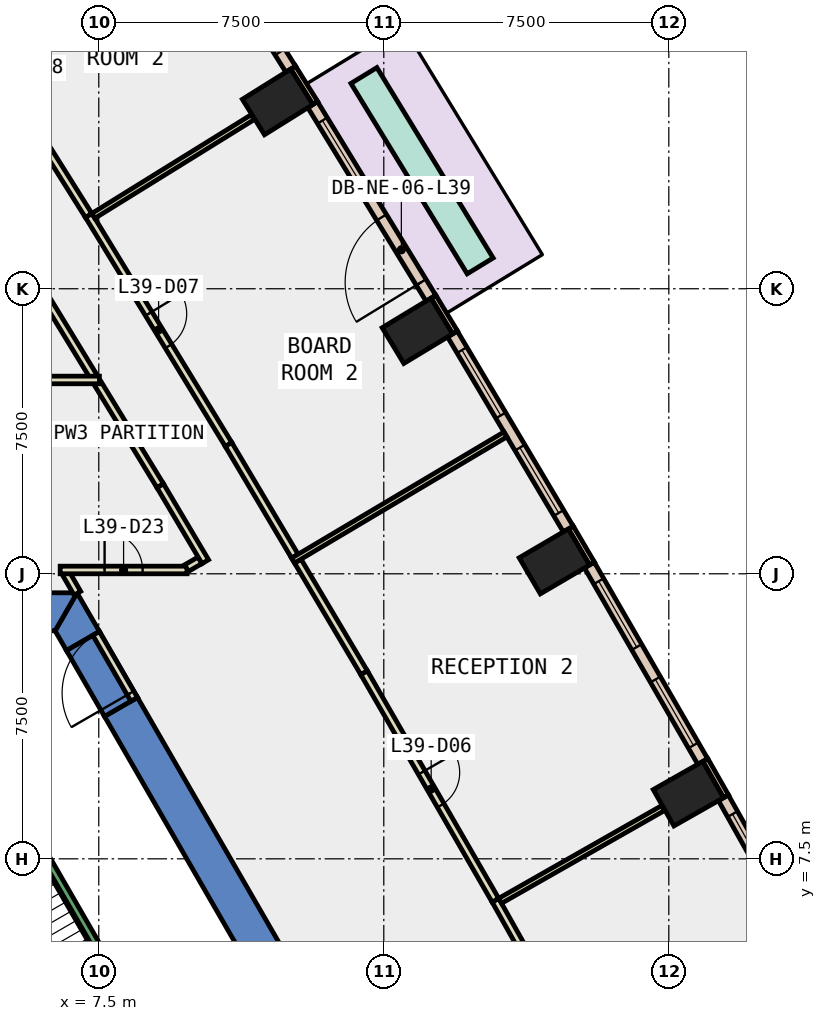
"""IFC4 building model, lengths in metres.
Left out: names, types, materials, properties, quantities, classifications, styles, units other than length and angle.
Written with IfcOpenShell. Run it as: python <this file> out.ifc"""

import sys

from ifc_helpers import new_model, si_unit, direction, frame, frame_2d, origin, origin_2d, place, context, subcontext, project, spatial, polyline, rectangle, outline, extrude, element, fill, save


model = new_model("IFC4")
c1 = context("Model", 3, precision=1e-05, world=origin(), true_north=direction((0.0, 1.0)))
c2 = subcontext(c1, "Body", "Model", "MODEL_VIEW")
j1 = project(units=[si_unit("LENGTHUNIT", "METRE"), si_unit("PLANEANGLEUNIT", "RADIAN")], contexts=[c1])
p1 = place(None, origin())
s1 = spatial("IfcSite", under=j1, at=p1, CompositionType="ELEMENT")
p2 = place(p1, origin())
s2 = spatial("IfcBuilding", under=s1, at=p2, CompositionType="ELEMENT")
p3 = place(p2, frame((0.0, 0.0, 176.0)))
s3 = spatial("IfcBuildingStorey", under=s2, at=p3, CompositionType="ELEMENT", Elevation=176.0)
for number, where, z_axis, x_axis in (
    (1, (23.015, 9.214, -0.4), (0.0, 0.0, 1.0), (-0.494, 0.869, 0.0)),
    (2, (19.488, 15.326, -0.4), (0.0, 0.0, 1.0), (-0.506, 0.863, 0.0)),
    (3, (15.884, 21.393, -0.4), (0.0, 0.0, 1.0), (-0.518, 0.855, 0.0)),
    (4, (12.206, 27.416, -0.4), (0.0, 0.0, 1.0), (-0.53, 0.848, 0.0)),
):
    element("IfcColumn", number, at=place(p3, frame(where, z_axis=z_axis, x_axis=x_axis)), inside=s3, PredefinedType="COLUMN", context=c2, shape_type="SweptSolid", body=[
        extrude(rectangle(XDim=1.1, YDim=1.5, at=origin_2d()), origin(), (0.0, 0.0, 1.0), 4.2),
    ])
p4 = place(p3, frame((0.0, 0.0, -0.4)))
e5 = element("IfcWall", 5, at=p4, inside=s3, PredefinedType="SHEAR", context=c2, shape_type="SweptSolid", body=[
    extrude(outline(polyline([(8.517, 11.748), (7.651, 11.248), (12.702, 2.5), (13.856, 2.5), (8.517, 11.748)])), origin(), (0.0, 0.0, 1.0), 4.2),
])
p5 = place(p3, frame((0.0, 0.0, -0.4)))
e6 = element("IfcWall", 6, at=p5, inside=s3, PredefinedType="SHEAR", context=c2, shape_type="SweptSolid", body=[
    extrude(outline(polyline([(6.651, 12.98), (7.517, 13.48), (6.928, 14.5), (6.351, 13.5), (6.651, 12.98)])), origin(), (0.0, 0.0, 1.0), 4.2),
])
p6 = place(p3, frame((0.0, 0.0, 3.6)))
e7 = element("IfcWall", 7, at=p6, inside=s3, PredefinedType="SHEAR", context=c2, shape_type="SweptSolid", body=[
    extrude(outline(polyline([(7.517, 13.48), (6.651, 12.98), (7.651, 11.248), (8.517, 11.748), (7.517, 13.48)])), origin(), (0.0, 0.0, 1.0), 0.2),
])
p7 = place(p3, frame((0.0, 0.0, -0.4)))
e8 = element("IfcWall", 8, at=p7, inside=s3, PredefinedType="SHEAR", context=c2, shape_type="SweptSolid", body=[
    extrude(outline(polyline([(6.928, 14.5), (-6.928, 14.5), (-6.351, 13.5), (6.351, 13.5), (6.928, 14.5)])), origin(), (0.0, 0.0, 1.0), 4.2),
])
p8 = place(p3, frame((24.005, 9.144, 0.0), z_axis=(0.0, 0.0, 1.0), x_axis=(-0.494512685492, 0.869170411305, 0.0)))
e9 = element("IfcWall", 9, at=p8, inside=s3, PredefinedType="STANDARD", context=c2, shape_type="SweptSolid", body=[
    extrude(rectangle(XDim=1.1, YDim=0.15, at=frame_2d((0.55, 0.0))), origin(), (0.0, 0.0, 1.0), 3.8),
])
p9 = place(p3, frame((20.478, 15.269, 0.0), z_axis=(0.0, 0.0, 1.0), x_axis=(-0.50667077411, 0.862139621327, 0.0)))
e10 = element("IfcWall", 10, at=p9, inside=s3, PredefinedType="STANDARD", context=c2, shape_type="SweptSolid", body=[
    extrude(rectangle(XDim=1.1, YDim=0.15, at=frame_2d((0.55, 0.0))), origin(), (0.0, 0.0, 1.0), 3.8),
])
p10 = place(p3, frame((16.875, 21.35, 0.0), z_axis=(0.0, 0.0, 1.0), x_axis=(-0.518178754102, 0.855272341888, 0.0)))
e11 = element("IfcWall", 11, at=p10, inside=s3, PredefinedType="STANDARD", context=c2, shape_type="SweptSolid", body=[
    extrude(rectangle(XDim=1.1, YDim=0.15, at=frame_2d((0.55, 0.0))), origin(), (0.0, 0.0, 1.0), 3.8),
])
p11 = place(p3, frame((13.197, 27.387, 0.0), z_axis=(0.0, 0.0, 1.0), x_axis=(-0.529879262372, 0.848073090782, 0.0)))
e12 = element("IfcWall", 12, at=p11, inside=s3, PredefinedType="STANDARD", context=c2, shape_type="SweptSolid", body=[
    extrude(rectangle(XDim=1.1, YDim=0.15, at=frame_2d((0.55, 0.0))), origin(), (0.0, 0.0, 1.0), 3.8),
])
p12 = place(p3, frame((26.857, 3.9, 0.0), z_axis=(0.0, 0.0, 1.0), x_axis=(-0.489305602904, 0.872112393541, 0.0)))
e13 = element("IfcWall", 13, at=p12, inside=s3, PredefinedType="STANDARD", context=c2, shape_type="SweptSolid", body=[
    extrude(rectangle(XDim=5.969, YDim=0.3, at=frame_2d((2.985, 0.0))), origin(), (0.0, 0.0, 1.0), 3.8),
])
p13 = place(p12, frame((0.492, 0.0, 0.9)))
e14 = element("IfcOpeningElement", 14, at=p13, cuts=e13, PredefinedType="OPENING", context=c2, shape_type="SweptSolid", body=[
    extrude(rectangle(XDim=2.0, YDim=2.6, at=frame_2d((1.0, 1.3))), frame((0.0, 0.16, 0.0), z_axis=(0.0, -1.0, 0.0), x_axis=(1.0, 0.0, 0.0)), (0.0, 0.0, 1.0), 0.32),
])
p14 = place(p12, frame((3.477, 0.0, 0.9)))
e15 = element("IfcOpeningElement", 15, at=p14, cuts=e13, PredefinedType="OPENING", context=c2, shape_type="SweptSolid", body=[
    extrude(rectangle(XDim=2.0, YDim=2.6, at=frame_2d((1.0, 1.3))), frame((0.0, 0.16, 0.0), z_axis=(0.0, -1.0, 0.0), x_axis=(1.0, 0.0, 0.0)), (0.0, 0.0, 1.0), 0.32),
])
p15 = place(p3, frame((23.393, 10.06, 0.0), z_axis=(0.0, 0.0, 1.0), x_axis=(-0.499908916093, 0.866077984716, 0.0)))
e16 = element("IfcWall", 16, at=p15, inside=s3, PredefinedType="STANDARD", context=c2, shape_type="SweptSolid", body=[
    extrude(rectangle(XDim=5.969, YDim=0.3, at=frame_2d((2.985, 0.0))), origin(), (0.0, 0.0, 1.0), 3.8),
])
p16 = place(p15, frame((0.492, 0.0, 0.9)))
e17 = element("IfcOpeningElement", 17, at=p16, cuts=e16, PredefinedType="OPENING", context=c2, shape_type="SweptSolid", body=[
    extrude(rectangle(XDim=2.0, YDim=2.6, at=frame_2d((1.0, 1.3))), frame((0.0, 0.16, 0.0), z_axis=(0.0, -1.0, 0.0), x_axis=(1.0, 0.0, 0.0)), (0.0, 0.0, 1.0), 0.32),
])
p17 = place(p15, frame((3.477, 0.0, 0.9)))
e18 = element("IfcOpeningElement", 18, at=p17, cuts=e16, PredefinedType="OPENING", context=c2, shape_type="SweptSolid", body=[
    extrude(rectangle(XDim=2.0, YDim=2.6, at=frame_2d((1.0, 1.3))), frame((0.0, 0.16, 0.0), z_axis=(0.0, -1.0, 0.0), x_axis=(1.0, 0.0, 0.0)), (0.0, 0.0, 1.0), 0.32),
])
p18 = place(p3, frame((19.854, 16.177, 0.0), z_axis=(0.0, 0.0, 1.0), x_axis=(-0.510653096173, 0.859786842984, 0.0)))
e19 = element("IfcWall", 19, at=p18, inside=s3, PredefinedType="STANDARD", context=c2, shape_type="SweptSolid", body=[
    extrude(rectangle(XDim=5.969, YDim=0.3, at=frame_2d((2.984, 0.0))), origin(), (0.0, 0.0, 1.0), 3.8),
])
p19 = place(p18, frame((0.492, 0.0, 0.9)))
e20 = element("IfcOpeningElement", 20, at=p19, cuts=e19, PredefinedType="OPENING", context=c2, shape_type="SweptSolid", body=[
    extrude(rectangle(XDim=2.0, YDim=2.6, at=frame_2d((1.0, 1.3))), frame((0.0, 0.16, 0.0), z_axis=(0.0, -1.0, 0.0), x_axis=(1.0, 0.0, 0.0)), (0.0, 0.0, 1.0), 0.32),
])
p20 = place(p18, frame((3.477, 0.0, 0.9)))
e21 = element("IfcOpeningElement", 21, at=p20, cuts=e19, PredefinedType="OPENING", context=c2, shape_type="SweptSolid", body=[
    extrude(rectangle(XDim=2.0, YDim=2.6, at=frame_2d((1.0, 1.3))), frame((0.0, 0.16, 0.0), z_axis=(0.0, -1.0, 0.0), x_axis=(1.0, 0.0, 0.0)), (0.0, 0.0, 1.0), 0.32),
])
p21 = place(p3, frame((16.24, 22.25, 0.0), z_axis=(0.0, 0.0, 1.0), x_axis=(-0.521263083766, 0.8533960379, 0.0)))
e22 = element("IfcWall", 22, at=p21, inside=s3, PredefinedType="STANDARD", context=c2, shape_type="SweptSolid", body=[
    extrude(rectangle(XDim=5.97, YDim=0.3, at=frame_2d((2.985, 0.0))), origin(), (0.0, 0.0, 1.0), 3.8),
])
p22 = place(p21, frame((0.493, 0.0, 0.0)))
e23 = element("IfcOpeningElement", 23, at=p22, cuts=e22, PredefinedType="OPENING", context=c2, shape_type="SweptSolid", body=[
    extrude(rectangle(XDim=2.0, YDim=2.4, at=frame_2d((1.0, 1.2))), frame((0.0, 0.16, 0.0), z_axis=(0.0, -1.0, 0.0), x_axis=(1.0, 0.0, 0.0)), (0.0, 0.0, 1.0), 0.32),
])
p23 = place(p21, frame((3.478, 0.0, 0.9)))
e24 = element("IfcOpeningElement", 24, at=p23, cuts=e22, PredefinedType="OPENING", context=c2, shape_type="SweptSolid", body=[
    extrude(rectangle(XDim=2.0, YDim=2.6, at=frame_2d((1.0, 1.3))), frame((0.0, 0.16, 0.0), z_axis=(0.0, -1.0, 0.0), x_axis=(1.0, 0.0, 0.0)), (0.0, 0.0, 1.0), 0.32),
])
p24 = place(p3, frame((12.55, 28.279, 0.0), z_axis=(0.0, 0.0, 1.0), x_axis=(-0.531816047834, 0.846859900613, 0.0)))
e25 = element("IfcWall", 25, at=p24, inside=s3, PredefinedType="STANDARD", context=c2, shape_type="SweptSolid", body=[
    extrude(rectangle(XDim=6.119, YDim=0.3, at=frame_2d((3.06, 0.0))), origin(), (0.0, 0.0, 1.0), 3.8),
])
p25 = place(p24, frame((0.53, 0.0, 0.9)))
e26 = element("IfcOpeningElement", 26, at=p25, cuts=e25, PredefinedType="OPENING", context=c2, shape_type="SweptSolid", body=[
    extrude(rectangle(XDim=2.0, YDim=2.6, at=frame_2d((1.0, 1.3))), frame((0.0, 0.16, 0.0), z_axis=(0.0, -1.0, 0.0), x_axis=(1.0, 0.0, 0.0)), (0.0, 0.0, 1.0), 0.32),
])
p26 = place(p24, frame((3.589, 0.0, 0.9)))
e27 = element("IfcOpeningElement", 27, at=p26, cuts=e25, PredefinedType="OPENING", context=c2, shape_type="SweptSolid", body=[
    extrude(rectangle(XDim=2.0, YDim=2.6, at=frame_2d((1.0, 1.3))), frame((0.0, 0.16, 0.0), z_axis=(0.0, -1.0, 0.0), x_axis=(1.0, 0.0, 0.0)), (0.0, 0.0, 1.0), 0.32),
])
p27 = place(p3, frame((17.536, 23.101, 0.0), z_axis=(0.0, 0.0, 1.0), x_axis=(-0.521098354491, 0.853496634409, 0.0)))
e28 = element("IfcWall", 28, at=p27, inside=s3, PredefinedType="STANDARD", context=c2, shape_type="SweptSolid", body=[
    extrude(rectangle(XDim=5.87, YDim=0.8, at=frame_2d((2.935, 0.0))), origin(), (0.0, 0.0, 1.0), 0.8),
])
p28 = place(p3, frame((6.937, 14.488, 0.0), z_axis=(0.0, 0.0, 1.0), x_axis=(-0.499908430952, 0.866078264744, 0.0)))
e29 = element("IfcWall", 29, at=p28, inside=s3, PredefinedType="PARTITIONING", context=c2, shape_type="SweptSolid", body=[
    extrude(rectangle(XDim=0.606, YDim=0.2, at=frame_2d((0.303, 0.0))), origin(), (0.0, 0.0, 1.0), 3.75),
])
p29 = place(p3, frame((6.484, 15.1, 0.0), z_axis=(0.0, 0.0, 1.0), x_axis=(1.0, 0.0, 0.0)))
e30 = element("IfcWall", 30, at=p29, inside=s3, PredefinedType="PARTITIONING", context=c2, shape_type="SweptSolid", body=[
    extrude(rectangle(XDim=3.339, YDim=0.2, at=frame_2d((1.669, 0.0))), origin(), (0.0, 0.0, 1.0), 3.75),
])
p30 = place(p29, frame((1.169, 0.0, 0.0)))
e31 = element("IfcOpeningElement", 31, at=p30, cuts=e30, PredefinedType="OPENING", context=c2, shape_type="SweptSolid", body=[
    extrude(rectangle(XDim=1.0, YDim=2.1, at=frame_2d((0.5, 1.05))), frame((0.0, 0.11, 0.0), z_axis=(0.0, -1.0, 0.0), x_axis=(1.0, 0.0, 0.0)), (0.0, 0.0, 1.0), 0.22),
])
p31 = place(p3, frame((9.81, 15.15, 0.0), z_axis=(0.0, 0.0, 1.0), x_axis=(0.865888002441, 0.500237910626, 0.0)))
e32 = element("IfcWall", 32, at=p31, inside=s3, PredefinedType="PARTITIONING", context=c2, shape_type="SweptSolid", body=[
    extrude(rectangle(XDim=0.41, YDim=0.2, at=frame_2d((0.205, 0.0))), origin(), (0.0, 0.0, 1.0), 3.75),
])
p32 = place(p3, frame((10.303, 15.319, 0.0), z_axis=(0.0, 0.0, 1.0), x_axis=(-0.510383520765, 0.859946894716, 0.0)))
e33 = element("IfcWall", 33, at=p32, inside=s3, PredefinedType="PARTITIONING", context=c2, shape_type="SweptSolid", body=[
    extrude(rectangle(XDim=2.326, YDim=0.2, at=frame_2d((1.163, 0.0))), origin(), (0.0, 0.0, 1.0), 3.75),
])
p33 = place(p3, frame((9.116, 17.319, 0.0), z_axis=(0.0, 0.0, 1.0), x_axis=(-0.521343721083, 0.853346778565, 0.0)))
e34 = element("IfcWall", 34, at=p33, inside=s3, PredefinedType="PARTITIONING", context=c2, shape_type="SweptSolid", body=[
    extrude(rectangle(XDim=3.159, YDim=0.2, at=frame_2d((1.58, 0.0))), origin(), (0.0, 0.0, 1.0), 3.75),
])
p34 = place(p3, frame((7.365, 20.185, 0.0), z_axis=(0.0, 0.0, 1.0), x_axis=(-0.521206053955, 0.853430869679, 0.0)))
e35 = element("IfcWall", 35, at=p34, inside=s3, PredefinedType="PARTITIONING", context=c2, shape_type="SweptSolid", body=[
    extrude(rectangle(XDim=3.603, YDim=0.2, at=frame_2d((1.802, 0.0))), origin(), (0.0, 0.0, 1.0), 3.75),
])
p35 = place(p3, frame((17.938, 6.411, 0.0), z_axis=(0.0, 0.0, 1.0), x_axis=(0.48930419744, -0.872113182086, 0.0)))
e36 = element("IfcWall", 36, at=p35, inside=s3, PredefinedType="PARTITIONING", context=c2, shape_type="SweptSolid", body=[
    extrude(rectangle(XDim=7.063, YDim=0.2, at=frame_2d((3.532, 0.0))), origin(), (0.0, 0.0, 1.0), 3.75),
])
p36 = place(p35, frame((3.032, 0.0, 0.0)))
e37 = element("IfcOpeningElement", 37, at=p36, cuts=e36, PredefinedType="OPENING", context=c2, shape_type="SweptSolid", body=[
    extrude(rectangle(XDim=1.0, YDim=2.1, at=frame_2d((0.5, 1.05))), frame((0.0, 0.11, 0.0), z_axis=(0.0, -1.0, 0.0), x_axis=(1.0, 0.0, 0.0)), (0.0, 0.0, 1.0), 0.22),
])
p37 = place(p3, frame((12.737, 15.334, 0.0), z_axis=(0.0, 0.0, 1.0), x_axis=(0.51050904729, -0.859872381598, 0.0)))
e38 = element("IfcWall", 38, at=p37, inside=s3, PredefinedType="PARTITIONING", context=c2, shape_type="SweptSolid", body=[
    extrude(rectangle(XDim=3.418, YDim=0.2, at=frame_2d((1.709, 0.0))), origin(), (0.0, 0.0, 1.0), 3.75),
])
p38 = place(p3, frame((14.482, 12.395, 0.0), z_axis=(0.0, 0.0, 1.0), x_axis=(0.499953847993, -0.866052048018, 0.0)))
e39 = element("IfcWall", 39, at=p38, inside=s3, PredefinedType="PARTITIONING", context=c2, shape_type="SweptSolid", body=[
    extrude(rectangle(XDim=6.911, YDim=0.2, at=frame_2d((3.456, 0.0))), origin(), (0.0, 0.0, 1.0), 3.75),
])
p39 = place(p38, frame((3.03, 0.0, 0.0)))
e40 = element("IfcOpeningElement", 40, at=p39, cuts=e39, PredefinedType="OPENING", context=c2, shape_type="SweptSolid", body=[
    extrude(rectangle(XDim=1.0, YDim=2.1, at=frame_2d((0.5, 1.05))), frame((0.0, 0.11, 0.0), z_axis=(0.0, -1.0, 0.0), x_axis=(1.0, 0.0, 0.0)), (0.0, 0.0, 1.0), 0.22),
])
p40 = place(p3, frame((7.234, 24.43, 0.0), z_axis=(0.0, 0.0, 1.0), x_axis=(0.521189922749, -0.853440721096, 0.0)))
e41 = element("IfcWall", 41, at=p40, inside=s3, PredefinedType="PARTITIONING", context=c2, shape_type="SweptSolid", body=[
    extrude(rectangle(XDim=7.063, YDim=0.2, at=frame_2d((3.531, 0.0))), origin(), (0.0, 0.0, 1.0), 3.75),
])
p41 = place(p40, frame((3.031, 0.0, 0.0)))
e42 = element("IfcOpeningElement", 42, at=p41, cuts=e41, PredefinedType="OPENING", context=c2, shape_type="SweptSolid", body=[
    extrude(rectangle(XDim=1.0, YDim=2.1, at=frame_2d((0.5, 1.05))), frame((0.0, 0.11, 0.0), z_axis=(0.0, -1.0, 0.0), x_axis=(1.0, 0.0, 0.0)), (0.0, 0.0, 1.0), 0.22),
])
p42 = place(p3, frame((10.915, 18.402, 0.0), z_axis=(0.0, 0.0, 1.0), x_axis=(0.510477693133, -0.85989099589, 0.0)))
e43 = element("IfcWall", 43, at=p42, inside=s3, PredefinedType="PARTITIONING", context=c2, shape_type="SweptSolid", body=[
    extrude(rectangle(XDim=3.418, YDim=0.2, at=frame_2d((1.709, 0.0))), origin(), (0.0, 0.0, 1.0), 3.75),
])
p43 = place(p3, frame((3.646, 30.142, 0.0), z_axis=(0.0, 0.0, 1.0), x_axis=(0.531621424046, -0.846982090422, 0.0)))
e44 = element("IfcWall", 44, at=p43, inside=s3, PredefinedType="PARTITIONING", context=c2, shape_type="SweptSolid", body=[
    extrude(rectangle(XDim=6.745, YDim=0.2, at=frame_2d((3.373, 0.0))), origin(), (0.0, 0.0, 1.0), 3.75),
])
p44 = place(p43, frame((2.948, 0.0, 0.0)))
e45 = element("IfcOpeningElement", 45, at=p44, cuts=e44, PredefinedType="OPENING", context=c2, shape_type="SweptSolid", body=[
    extrude(rectangle(XDim=1.0, YDim=2.1, at=frame_2d((0.5, 1.05))), frame((0.0, 0.11, 0.0), z_axis=(0.0, -1.0, 0.0), x_axis=(1.0, 0.0, 0.0)), (0.0, 0.0, 1.0), 0.22),
])
p45 = place(p3, frame((0.4, 20.1, 0.0), z_axis=(0.0, 0.0, 1.0), x_axis=(1.0, 0.0, 0.0)))
e46 = element("IfcWall", 46, at=p45, inside=s3, PredefinedType="PARTITIONING", context=c2, shape_type="SweptSolid", body=[
    extrude(rectangle(XDim=7.117, YDim=0.2, at=frame_2d((3.559, 0.0))), origin(), (0.0, 0.0, 1.0), 3.75),
])
p46 = place(p3, frame((18.062, 6.395, 0.0), z_axis=(0.0, 0.0, 1.0), x_axis=(0.869113540562, 0.494612629854, 0.0)))
e47 = element("IfcWall", 47, at=p46, inside=s3, PredefinedType="PARTITIONING", context=c2, shape_type="SweptSolid", body=[
    extrude(rectangle(XDim=4.929, YDim=0.15, at=frame_2d((2.465, 0.0))), origin(), (0.0, 0.0, 1.0), 3.75),
])
p47 = place(p3, frame((12.613, 15.348, 0.0), z_axis=(0.0, 0.0, 1.0), x_axis=(0.85976815765, 0.510684555368, 0.0)))
e48 = element("IfcWall", 48, at=p47, inside=s3, PredefinedType="PARTITIONING", context=c2, shape_type="SweptSolid", body=[
    extrude(rectangle(XDim=6.499, YDim=0.15, at=frame_2d((3.25, 0.0))), origin(), (0.0, 0.0, 1.0), 3.75),
])
p48 = place(p3, frame((7.358, 24.418, 0.0), z_axis=(0.0, 0.0, 1.0), x_axis=(0.850136365231, 0.526562589358, 0.0)))
e49 = element("IfcWall", 49, at=p48, inside=s3, PredefinedType="PARTITIONING", context=c2, shape_type="SweptSolid", body=[
    extrude(rectangle(XDim=4.93, YDim=0.15, at=frame_2d((2.465, 0.0))), origin(), (0.0, 0.0, 1.0), 3.75),
])
p49 = place(p3, frame((8.43, 11.698, 0.0), z_axis=(0.0, 0.0, 1.0), x_axis=(-0.50002537861, 0.866010750942, 0.0)))
e50 = element("IfcWall", 50, at=p49, inside=s3, PredefinedType="PARTITIONING", context=c2, shape_type="SweptSolid", body=[
    extrude(rectangle(XDim=2.0, YDim=0.2, at=frame_2d((1.0, 0.0))), origin(), (0.0, 0.0, 1.0), 2.4),
])
p50 = place(p49, frame((0.19, 0.0, 0.0)))
e51 = element("IfcOpeningElement", 51, at=p50, cuts=e50, PredefinedType="OPENING", context=c2, shape_type="SweptSolid", body=[
    extrude(rectangle(XDim=1.8, YDim=2.1, at=frame_2d((0.9, 1.05))), frame((0.0, 0.11, 0.0), z_axis=(0.0, -1.0, 0.0), x_axis=(1.0, 0.0, 0.0)), (0.0, 0.0, 1.0), 0.22),
])
p51 = place(p3, frame((8.48, 3.412, 0.0), z_axis=(0.0, 0.0, 1.0), x_axis=(-0.499978703459, 0.866037698999, 0.0)))
e52 = element("IfcWall", 52, at=p51, inside=s3, PredefinedType="STANDARD", context=c2, shape_type="SweptSolid", body=[
    extrude(rectangle(XDim=6.9, YDim=0.2, at=frame_2d((3.45, 0.0))), origin(), (0.0, 0.0, 1.0), 3.75),
])
p52 = place(p14, origin())
e53 = element("IfcWindow", 53, at=p52, inside=s3, PartitioningType="SINGLE_PANEL", PredefinedType="WINDOW", context=c2, shape_type="SweptSolid", body=[
    extrude(rectangle(XDim=2.0, YDim=2.6, at=frame_2d((1.0, 1.3))), frame((0.0, 0.03, 0.0), z_axis=(0.0, -1.0, 0.0), x_axis=(1.0, 0.0, 0.0)), (0.0, 0.0, 1.0), 0.06),
])
fill(e15, e53)
p53 = place(p16, origin())
e54 = element("IfcWindow", 54, at=p53, inside=s3, PartitioningType="SINGLE_PANEL", PredefinedType="WINDOW", context=c2, shape_type="SweptSolid", body=[
    extrude(rectangle(XDim=2.0, YDim=2.6, at=frame_2d((1.0, 1.3))), frame((0.0, 0.03, 0.0), z_axis=(0.0, -1.0, 0.0), x_axis=(1.0, 0.0, 0.0)), (0.0, 0.0, 1.0), 0.06),
])
fill(e17, e54)
p54 = place(p17, origin())
e55 = element("IfcWindow", 55, at=p54, inside=s3, PartitioningType="SINGLE_PANEL", PredefinedType="WINDOW", context=c2, shape_type="SweptSolid", body=[
    extrude(rectangle(XDim=2.0, YDim=2.6, at=frame_2d((1.0, 1.3))), frame((0.0, 0.03, 0.0), z_axis=(0.0, -1.0, 0.0), x_axis=(1.0, 0.0, 0.0)), (0.0, 0.0, 1.0), 0.06),
])
fill(e18, e55)
p55 = place(p19, origin())
e56 = element("IfcWindow", 56, at=p55, inside=s3, PartitioningType="SINGLE_PANEL", PredefinedType="WINDOW", context=c2, shape_type="SweptSolid", body=[
    extrude(rectangle(XDim=2.0, YDim=2.6, at=frame_2d((1.0, 1.3))), frame((0.0, 0.03, 0.0), z_axis=(0.0, -1.0, 0.0), x_axis=(1.0, 0.0, 0.0)), (0.0, 0.0, 1.0), 0.06),
])
fill(e20, e56)
p56 = place(p20, origin())
e57 = element("IfcWindow", 57, at=p56, inside=s3, PartitioningType="SINGLE_PANEL", PredefinedType="WINDOW", context=c2, shape_type="SweptSolid", body=[
    extrude(rectangle(XDim=2.0, YDim=2.6, at=frame_2d((1.0, 1.3))), frame((0.0, 0.03, 0.0), z_axis=(0.0, -1.0, 0.0), x_axis=(1.0, 0.0, 0.0)), (0.0, 0.0, 1.0), 0.06),
])
fill(e21, e57)
p57 = place(p22, origin())
e58 = element("IfcDoor", 58, at=p57, inside=s3, OperationType="SLIDING_TO_LEFT", PredefinedType="DOOR", context=c2, shape_type="SweptSolid", body=[
    extrude(rectangle(XDim=2.0, YDim=2.4, at=frame_2d((1.0, 1.2))), frame((0.0, 0.025, 0.0), z_axis=(0.0, -1.0, 0.0), x_axis=(1.0, 0.0, 0.0)), (0.0, 0.0, 1.0), 0.05),
])
fill(e23, e58)
p58 = place(p23, origin())
e59 = element("IfcWindow", 59, at=p58, inside=s3, PartitioningType="SINGLE_PANEL", PredefinedType="WINDOW", context=c2, shape_type="SweptSolid", body=[
    extrude(rectangle(XDim=2.0, YDim=2.6, at=frame_2d((1.0, 1.3))), frame((0.0, 0.03, 0.0), z_axis=(0.0, -1.0, 0.0), x_axis=(1.0, 0.0, 0.0)), (0.0, 0.0, 1.0), 0.06),
])
fill(e24, e59)
p59 = place(p25, origin())
e60 = element("IfcWindow", 60, at=p59, inside=s3, PartitioningType="SINGLE_PANEL", PredefinedType="WINDOW", context=c2, shape_type="SweptSolid", body=[
    extrude(rectangle(XDim=2.0, YDim=2.6, at=frame_2d((1.0, 1.3))), frame((0.0, 0.03, 0.0), z_axis=(0.0, -1.0, 0.0), x_axis=(1.0, 0.0, 0.0)), (0.0, 0.0, 1.0), 0.06),
])
fill(e26, e60)
p60 = place(p39, origin())
e61 = element("IfcDoor", 61, at=p60, inside=s3, OperationType="SINGLE_SWING_LEFT", PredefinedType="DOOR", context=c2, shape_type="SweptSolid", body=[
    extrude(rectangle(XDim=1.0, YDim=2.1, at=frame_2d((0.5, 1.05))), frame((0.0, 0.025, 0.0), z_axis=(0.0, -1.0, 0.0), x_axis=(1.0, 0.0, 0.0)), (0.0, 0.0, 1.0), 0.05),
])
fill(e40, e61)
p61 = place(p41, origin())
e62 = element("IfcDoor", 62, at=p61, inside=s3, OperationType="SINGLE_SWING_RIGHT", PredefinedType="DOOR", context=c2, shape_type="SweptSolid", body=[
    extrude(rectangle(XDim=1.0, YDim=2.1, at=frame_2d((0.5, 1.05))), frame((0.0, 0.025, 0.0), z_axis=(0.0, -1.0, 0.0), x_axis=(1.0, 0.0, 0.0)), (0.0, 0.0, 1.0), 0.05),
])
fill(e42, e62)
p62 = place(p30, origin())
e63 = element("IfcDoor", 63, at=p62, inside=s3, OperationType="SINGLE_SWING_LEFT", PredefinedType="DOOR", context=c2, shape_type="SweptSolid", body=[
    extrude(rectangle(XDim=1.0, YDim=2.1, at=frame_2d((0.5, 1.05))), frame((0.0, 0.025, 0.0), z_axis=(0.0, -1.0, 0.0), x_axis=(1.0, 0.0, 0.0)), (0.0, 0.0, 1.0), 0.05),
])
fill(e31, e63)
p63 = place(p50, origin())
e64 = element("IfcDoor", 64, at=p63, inside=s3, OperationType="DOUBLE_DOOR_SINGLE_SWING", PredefinedType="DOOR", context=c2, shape_type="SweptSolid", body=[
    extrude(rectangle(XDim=1.8, YDim=2.1, at=frame_2d((0.9, 1.05))), frame((0.0, 0.025, 0.0), z_axis=(0.0, -1.0, 0.0), x_axis=(1.0, 0.0, 0.0)), (0.0, 0.0, 1.0), 0.05),
])
fill(e51, e64)
save(model, sys.argv[1])
